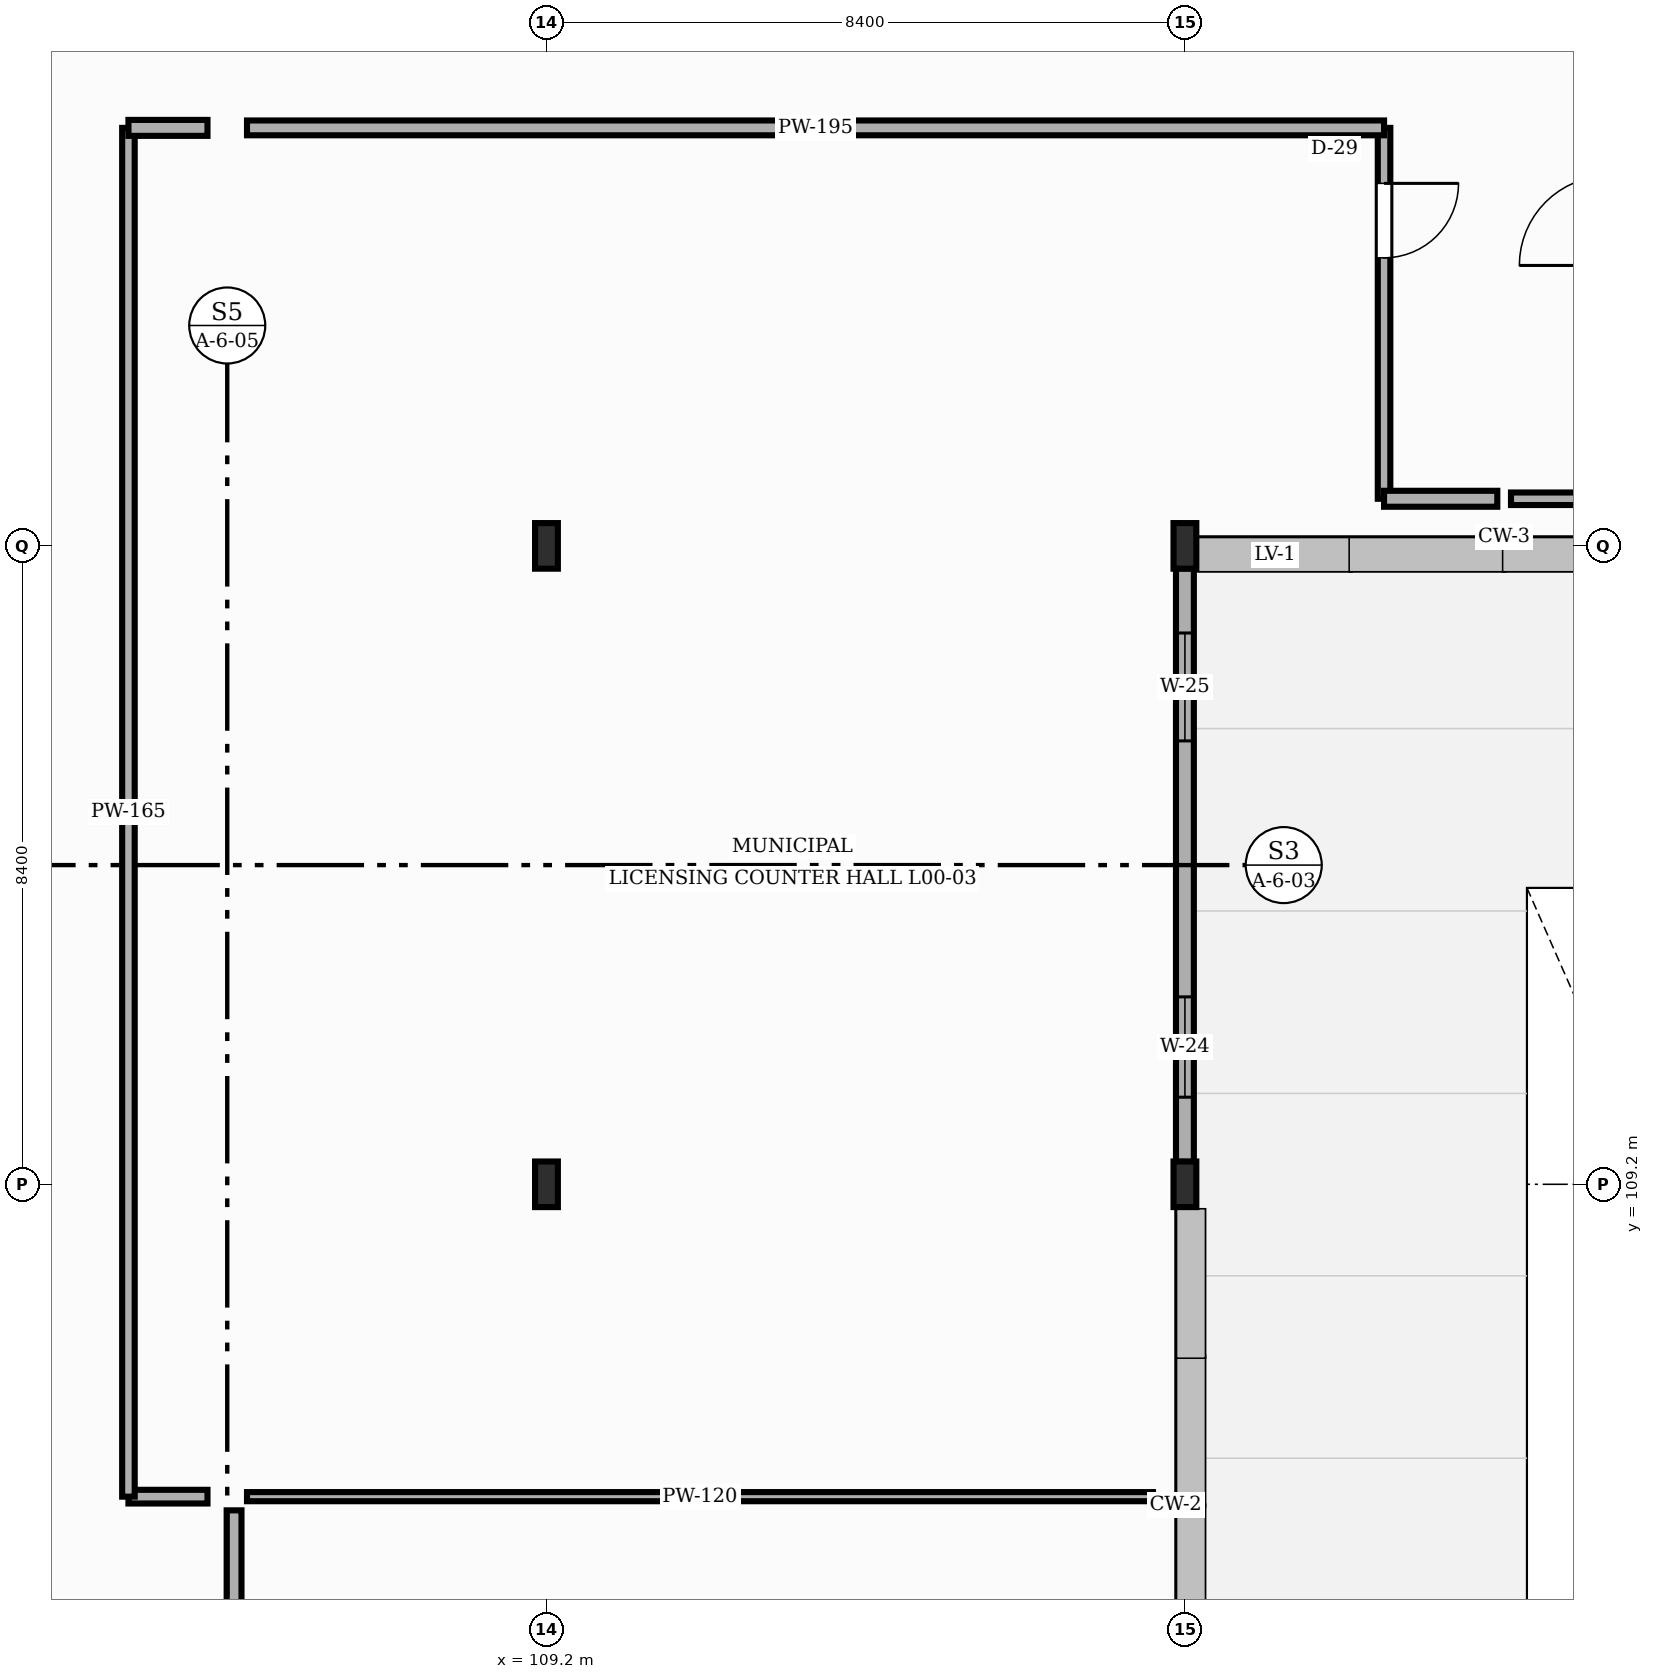
"""IFC4 building model, lengths in metres.
Left out: names, types, materials, properties, quantities, classifications, styles, units other than length and angle.
Written with IfcOpenShell. Run it as: python <this file> out.ifc"""

import sys

from ifc_helpers import new_model, si_unit, direction, frame, frame_2d, origin, origin_2d, place, context, subcontext, project, spatial, rectangle, i_section, extrude, element, fill, save


model = new_model("IFC4")
c1 = context("Model", 3, precision=1e-05, world=origin(), true_north=direction((0.0, 1.0)))
c2 = subcontext(c1, "Body", "Model", "MODEL_VIEW")
j1 = project(units=[si_unit("LENGTHUNIT", "METRE"), si_unit("PLANEANGLEUNIT", "RADIAN")], contexts=[c1])
p1 = place(None, origin())
s1 = spatial("IfcSite", under=j1, at=p1, CompositionType="ELEMENT")
p2 = place(p1, origin())
s2 = spatial("IfcBuilding", under=s1, at=p2, CompositionType="ELEMENT")
p3 = place(p2, origin())
s3 = spatial("IfcBuildingStorey", under=s2, at=p3, CompositionType="ELEMENT", Elevation=0.0)
for number, where, z_axis, x_axis in (
    (1, (109.2, 109.2, 0.0), (0.0, 0.0, 1.0), (1.0, 0.0, 0.0)),
    (2, (109.2, 117.6, 0.0), (0.0, 0.0, 1.0), (1.0, 0.0, 0.0)),
    (3, (117.6, 109.2, 0.0), (0.0, 0.0, 1.0), (1.0, 0.0, 0.0)),
    (4, (117.6, 117.6, 0.0), (0.0, 0.0, 1.0), (1.0, 0.0, 0.0)),
):
    element("IfcColumn", number, at=place(p3, frame(where, z_axis=z_axis, x_axis=x_axis)), inside=s3, PredefinedType="COLUMN", context=c2, shape_type="SweptSolid", body=[
        extrude(i_section(OverallWidth=0.3, OverallDepth=0.6, WebThickness=0.015, FlangeThickness=0.03, FilletRadius=0.027, at=origin_2d()), origin(), (0.0, 0.0, 1.0), 5.4),
    ])
p4 = place(p3, frame((117.6, 109.496, 0.0), z_axis=(0.0, 0.0, 1.0), x_axis=(0.0, 1.0, 0.0)))
e5 = element("IfcWall", 5, at=p4, inside=s3, PredefinedType="STANDARD", context=c2, shape_type="SweptSolid", body=[
    extrude(rectangle(XDim=7.808, YDim=0.235, at=frame_2d((3.904, 0.0))), origin(), (0.0, 0.0, 1.0), 4.887),
])
p5 = place(p4, frame((0.85, 0.0, 0.9)))
e6 = element("IfcOpeningElement", 6, at=p5, cuts=e5, PredefinedType="OPENING", context=c2, shape_type="SweptSolid", body=[
    extrude(rectangle(XDim=1.32, YDim=1.45, at=frame_2d((0.66, 0.725))), frame((0.0, 0.127, 0.0), z_axis=(0.0, -1.0, 0.0), x_axis=(1.0, 0.0, 0.0)), (0.0, 0.0, 1.0), 0.255),
])
p6 = place(p4, frame((5.538, 0.0, 0.9)))
e7 = element("IfcOpeningElement", 7, at=p6, cuts=e5, PredefinedType="OPENING", context=c2, shape_type="SweptSolid", body=[
    extrude(rectangle(XDim=1.42, YDim=1.45, at=frame_2d((0.71, 0.725))), frame((0.0, 0.127, 0.0), z_axis=(0.0, -1.0, 0.0), x_axis=(1.0, 0.0, 0.0)), (0.0, 0.0, 1.0), 0.255),
])
p7 = place(p3, frame((120.22, 123.1, -0.004), z_axis=(0.0, 0.0, 1.0), x_axis=(0.0, -1.0, 0.0)))
e8 = element("IfcWall", 8, at=p7, inside=s3, PredefinedType="STANDARD", context=c2, shape_type="SweptSolid", body=[
    extrude(rectangle(XDim=4.88, YDim=0.165, at=frame_2d((2.44, 0.0))), origin(), (0.0, 0.0, 1.0), 4.921),
])
p8 = place(p7, frame((0.73, 0.0, 0.0)))
e9 = element("IfcOpeningElement", 9, at=p8, cuts=e8, PredefinedType="OPENING", context=c2, shape_type="SweptSolid", body=[
    extrude(rectangle(XDim=0.98, YDim=2.3, at=frame_2d((0.49, 1.15))), frame((0.0, 0.093, 0.0), z_axis=(0.0, -1.0, 0.0), x_axis=(1.0, 0.0, 0.0)), (0.0, 0.0, 1.0), 0.185),
])
p9 = place(p3, frame((120.22, 118.22, -0.004), z_axis=(0.0, 0.0, 1.0), x_axis=(1.0, 0.0, 0.0)))
e10 = element("IfcWall", 10, at=p9, inside=s3, PredefinedType="STANDARD", context=c2, shape_type="SweptSolid", body=[
    extrude(rectangle(XDim=1.49, YDim=0.21, at=frame_2d((0.745, 0.0))), origin(), (0.0, 0.0, 1.0), 5.179),
])
p10 = place(p3, frame((117.18, 105.09, -0.004), z_axis=(0.0, 0.0, 1.0), x_axis=(-1.0, 0.0, 0.0)))
e11 = element("IfcWall", 11, at=p10, inside=s3, PredefinedType="STANDARD", context=c2, shape_type="SweptSolid", body=[
    extrude(rectangle(XDim=11.92, YDim=0.12, at=frame_2d((5.96, 0.0))), origin(), (0.0, 0.0, 1.0), 5.179),
])
p11 = place(p3, frame((104.74, 105.09, -0.004), z_axis=(0.0, 0.0, 1.0), x_axis=(-1.0, 0.0, 0.0)))
e12 = element("IfcWall", 12, at=p11, inside=s3, PredefinedType="STANDARD", context=c2, shape_type="SweptSolid", body=[
    extrude(rectangle(XDim=1.04, YDim=0.18, at=frame_2d((0.52, 0.0))), origin(), (0.0, 0.0, 1.0), 5.179),
])
p12 = place(p3, frame((103.7, 105.09, -0.004), z_axis=(0.0, 0.0, 1.0), x_axis=(0.0, 1.0, 0.0)))
e13 = element("IfcWall", 13, at=p12, inside=s3, PredefinedType="STANDARD", context=c2, shape_type="SweptSolid", body=[
    extrude(rectangle(XDim=18.01, YDim=0.165, at=frame_2d((9.005, 0.0))), origin(), (0.0, 0.0, 1.0), 4.861),
])
p13 = place(p3, frame((103.7, 123.1, -0.004), z_axis=(0.0, 0.0, 1.0), x_axis=(1.0, 0.0, 0.0)))
e14 = element("IfcWall", 14, at=p13, inside=s3, PredefinedType="STANDARD", context=c2, shape_type="SweptSolid", body=[
    extrude(rectangle(XDim=1.04, YDim=0.21, at=frame_2d((0.52, 0.0))), origin(), (0.0, 0.0, 1.0), 5.179),
])
p14 = place(p3, frame((105.26, 123.1, -0.004), z_axis=(0.0, 0.0, 1.0), x_axis=(1.0, 0.0, 0.0)))
e15 = element("IfcWall", 15, at=p14, inside=s3, PredefinedType="STANDARD", context=c2, shape_type="SweptSolid", body=[
    extrude(rectangle(XDim=14.96, YDim=0.195, at=frame_2d((7.48, 0.0))), origin(), (0.0, 0.0, 1.0), 5.179),
])
p15 = place(p3, frame((105.09, 100.18, -0.004), z_axis=(0.0, 0.0, 1.0), x_axis=(0.0, 1.0, 0.0)))
e16 = element("IfcWall", 16, at=p15, inside=s3, PredefinedType="STANDARD", context=c2, shape_type="SweptSolid", body=[
    extrude(rectangle(XDim=4.73, YDim=0.195, at=frame_2d((2.365, 0.0))), origin(), (0.0, 0.0, 1.0), 5.179),
])
p16 = place(p3, frame((121.89, 118.22, -0.004), z_axis=(0.0, 0.0, 1.0), x_axis=(1.0, 0.0, 0.0)))
e17 = element("IfcWall", 17, at=p16, inside=s3, PredefinedType="STANDARD", context=c2, shape_type="SweptSolid", body=[
    extrude(rectangle(XDim=1.29, YDim=0.165, at=frame_2d((0.645, 0.0))), origin(), (0.0, 0.0, 1.0), 5.179),
])
p17 = place(p5, origin())
e18 = element("IfcWindow", 18, at=p17, inside=s3, PartitioningType="SINGLE_PANEL", PredefinedType="WINDOW", context=c2, shape_type="SweptSolid", body=[
    extrude(rectangle(XDim=1.32, YDim=1.45, at=frame_2d((0.66, 0.725))), frame((0.0, 0.03, 0.0), z_axis=(0.0, -1.0, 0.0), x_axis=(1.0, 0.0, 0.0)), (0.0, 0.0, 1.0), 0.06),
])
fill(e6, e18)
p18 = place(p6, origin())
e19 = element("IfcWindow", 19, at=p18, inside=s3, PartitioningType="SINGLE_PANEL", PredefinedType="WINDOW", context=c2, shape_type="SweptSolid", body=[
    extrude(rectangle(XDim=1.42, YDim=1.45, at=frame_2d((0.71, 0.725))), frame((0.0, 0.03, 0.0), z_axis=(0.0, -1.0, 0.0), x_axis=(1.0, 0.0, 0.0)), (0.0, 0.0, 1.0), 0.06),
])
fill(e7, e19)
p19 = place(p8, origin())
e20 = element("IfcDoor", 20, at=p19, inside=s3, OperationType="SINGLE_SWING_LEFT", PredefinedType="DOOR", context=c2, shape_type="SweptSolid", body=[
    extrude(rectangle(XDim=0.98, YDim=2.3, at=frame_2d((0.49, 1.15))), frame((0.0, 0.025, 0.0), z_axis=(0.0, -1.0, 0.0), x_axis=(1.0, 0.0, 0.0)), (0.0, 0.0, 1.0), 0.05),
])
fill(e9, e20)
save(model, sys.argv[1])
